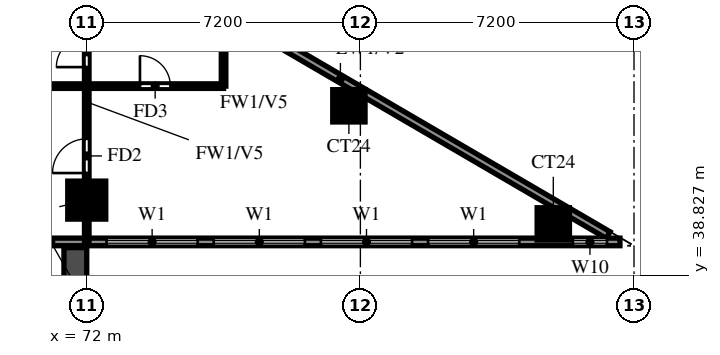
"""IFC4 building model, lengths in metres.
Left out: names, types, materials, properties, quantities, classifications, styles, units other than length and angle.
Written with IfcOpenShell. Run it as: python <this file> out.ifc"""

import sys

from ifc_helpers import new_model, si_unit, direction, frame, frame_2d, origin, origin_2d, place, context, subcontext, project, spatial, rectangle, extrude, source, transform, mapped, element, fill, save


model = new_model("IFC4")
c1 = context("Model", 3, precision=1e-05, world=origin(), true_north=direction((0.0, 1.0)))
c2 = subcontext(c1, "Body", "Model", "MODEL_VIEW")
j1 = project(units=[si_unit("LENGTHUNIT", "METRE"), si_unit("PLANEANGLEUNIT", "RADIAN")], contexts=[c1])
p1 = place(None, origin())
s1 = spatial("IfcSite", under=j1, at=p1, CompositionType="ELEMENT")
p2 = place(p1, origin())
s2 = spatial("IfcBuilding", under=s1, at=p2, CompositionType="ELEMENT")
p3 = place(p2, frame((0.0, 0.0, 167.5)))
s3 = spatial("IfcBuildingStorey", under=s2, at=p3, CompositionType="ELEMENT", Elevation=167.5)
m1 = source(origin(), c2, "Body", "SweptSolid", [
    extrude(rectangle(XDim=0.85, YDim=0.85, at=origin_2d()), origin(), (0.0, 0.0, 1.0), 3.2),
])
p4 = place(p3, frame((84.276, 40.174, 0.0), z_axis=(0.0, 0.0, 1.0), x_axis=(1.0, 0.0, 0.0)))
e1 = element("IfcColumn", 1, at=p4, inside=s3, PredefinedType="COLUMN", context=c2, shape_type="MappedRepresentation", body=[
    mapped(m1, transform((0.0, 0.0, 0.0))),
])
m2 = source(origin(), c2, "Body", "SweptSolid", [
    extrude(rectangle(XDim=1.0, YDim=1.0, at=origin_2d()), origin(), (0.0, 0.0, 1.0), 3.2),
])
p5 = place(p3, frame((72.0, 40.8, 0.0), z_axis=(0.0, 0.0, 1.0), x_axis=(1.0, 0.0, 0.0)))
e2 = element("IfcColumn", 2, at=p5, inside=s3, PredefinedType="COLUMN", context=c2, shape_type="MappedRepresentation", body=[
    mapped(m2, transform((0.0, 0.0, 0.0))),
])
p6 = place(p3, frame((78.898, 43.282, 0.0), z_axis=(0.0, 0.0, 1.0), x_axis=(1.0, 0.0, 0.0)))
e3 = element("IfcColumn", 3, at=p6, inside=s3, PredefinedType="COLUMN", context=c2, shape_type="MappedRepresentation", body=[
    mapped(m1, transform((0.0, 0.0, 0.0))),
])
p7 = place(p3, frame((85.719, 39.881, 0.0), z_axis=(0.0, 0.0, 1.0), x_axis=(-0.86377618652, 0.503875678716, 0.0)))
e4 = element("IfcWall", 4, at=p7, inside=s3, PredefinedType="SOLIDWALL", context=c2, shape_type="SweptSolid", body=[
    extrude(rectangle(XDim=16.311, YDim=0.2, at=frame_2d((8.156, 0.0))), origin(), (0.0, 0.0, 1.0), 3.2),
])
p8 = place(p7, frame((13.326, 0.0, 1.5)))
e5 = element("IfcOpeningElement", 5, at=p8, cuts=e4, PredefinedType="OPENING", context=c2, shape_type="SweptSolid", body=[
    extrude(rectangle(XDim=0.9, YDim=0.9, at=frame_2d((0.45, 0.45))), frame((0.0, 0.11, 0.0), z_axis=(0.0, -1.0, 0.0), x_axis=(1.0, 0.0, 0.0)), (0.0, 0.0, 1.0), 0.22),
])
p9 = place(p3, frame((58.8, 39.7, 0.0), z_axis=(0.0, 0.0, 1.0), x_axis=(1.0, 0.0, 0.0)))
e6 = element("IfcWall", 6, at=p9, inside=s3, PredefinedType="SOLIDWALL", context=c2, shape_type="SweptSolid", body=[
    extrude(rectangle(XDim=27.23, YDim=0.2, at=frame_2d((13.615, 0.0))), origin(), (0.0, 0.0, 1.0), 3.2),
])
p10 = place(p9, frame((7.5, 0.0, 0.0)))
e7 = element("IfcOpeningElement", 7, at=p10, cuts=e6, PredefinedType="OPENING", context=c2, shape_type="SweptSolid", body=[
    extrude(rectangle(XDim=1.8, YDim=2.4, at=frame_2d((0.9, 1.2))), frame((0.0, 0.11, 0.0), z_axis=(0.0, -1.0, 0.0), x_axis=(1.0, 0.0, 0.0)), (0.0, 0.0, 1.0), 0.22),
])
p11 = place(p9, frame((2.4, 0.0, 0.6)))
e8 = element("IfcOpeningElement", 8, at=p11, cuts=e6, PredefinedType="OPENING", context=c2, shape_type="SweptSolid", body=[
    extrude(rectangle(XDim=2.4, YDim=2.4, at=frame_2d((1.2, 1.2))), frame((0.0, 0.11, 0.0), z_axis=(0.0, -1.0, 0.0), x_axis=(1.0, 0.0, 0.0)), (0.0, 0.0, 1.0), 0.22),
])
p12 = place(p9, frame((13.72, 0.0, 0.6)))
e9 = element("IfcOpeningElement", 9, at=p12, cuts=e6, PredefinedType="OPENING", context=c2, shape_type="SweptSolid", body=[
    extrude(rectangle(XDim=2.4, YDim=2.4, at=frame_2d((1.2, 1.2))), frame((0.0, 0.11, 0.0), z_axis=(0.0, -1.0, 0.0), x_axis=(1.0, 0.0, 0.0)), (0.0, 0.0, 1.0), 0.22),
])
p13 = place(p9, frame((16.541, 0.0, 0.6)))
e10 = element("IfcOpeningElement", 10, at=p13, cuts=e6, PredefinedType="OPENING", context=c2, shape_type="SweptSolid", body=[
    extrude(rectangle(XDim=2.4, YDim=2.4, at=frame_2d((1.2, 1.2))), frame((0.0, 0.11, 0.0), z_axis=(0.0, -1.0, 0.0), x_axis=(1.0, 0.0, 0.0)), (0.0, 0.0, 1.0), 0.22),
])
p14 = place(p9, frame((19.361, 0.0, 0.6)))
e11 = element("IfcOpeningElement", 11, at=p14, cuts=e6, PredefinedType="OPENING", context=c2, shape_type="SweptSolid", body=[
    extrude(rectangle(XDim=2.4, YDim=2.4, at=frame_2d((1.2, 1.2))), frame((0.0, 0.11, 0.0), z_axis=(0.0, -1.0, 0.0), x_axis=(1.0, 0.0, 0.0)), (0.0, 0.0, 1.0), 0.22),
])
p15 = place(p9, frame((22.181, 0.0, 0.6)))
e12 = element("IfcOpeningElement", 12, at=p15, cuts=e6, PredefinedType="OPENING", context=c2, shape_type="SweptSolid", body=[
    extrude(rectangle(XDim=2.4, YDim=2.4, at=frame_2d((1.2, 1.2))), frame((0.0, 0.11, 0.0), z_axis=(0.0, -1.0, 0.0), x_axis=(1.0, 0.0, 0.0)), (0.0, 0.0, 1.0), 0.22),
])
p16 = place(p9, frame((25.99, 0.0, 0.6)))
e13 = element("IfcOpeningElement", 13, at=p16, cuts=e6, PredefinedType="OPENING", context=c2, shape_type="SweptSolid", body=[
    extrude(rectangle(XDim=0.9, YDim=2.4, at=frame_2d((0.45, 1.2))), frame((0.0, 0.11, 0.0), z_axis=(0.0, -1.0, 0.0), x_axis=(1.0, 0.0, 0.0)), (0.0, 0.0, 1.0), 0.22),
])
p17 = place(p3, frame((71.7, 39.55, 0.0), z_axis=(0.0, 0.0, 1.0), x_axis=(0.0, -1.0, 0.0)))
e14 = element("IfcWall", 14, at=p17, inside=s3, PredefinedType="SOLIDWALL", context=c2, shape_type="SweptSolid", body=[
    extrude(rectangle(XDim=2.65, YDim=0.6, at=frame_2d((1.325, 0.0))), origin(), (0.0, 0.0, 1.0), 2.85),
])
p18 = place(p3, frame((60.0, 43.8, 0.0), z_axis=(0.0, 0.0, 1.0), x_axis=(1.0, 0.0, 0.0)))
e15 = element("IfcWall", 15, at=p18, inside=s3, PredefinedType="PARTITIONING", context=c2, shape_type="SweptSolid", body=[
    extrude(rectangle(XDim=15.6, YDim=0.12, at=frame_2d((7.8, 0.0))), origin(), (0.0, 0.0, 1.0), 3.2),
])
p19 = place(p18, frame((9.75, 0.0, 0.0)))
e16 = element("IfcOpeningElement", 16, at=p19, cuts=e15, PredefinedType="OPENING", context=c2, shape_type="SweptSolid", body=[
    extrude(rectangle(XDim=0.9, YDim=2.1, at=frame_2d((0.45, 1.05))), frame((0.0, 0.07, 0.0), z_axis=(0.0, -1.0, 0.0), x_axis=(1.0, 0.0, 0.0)), (0.0, 0.0, 1.0), 0.14),
])
p20 = place(p18, frame((3.45, 0.0, 0.0)))
e17 = element("IfcOpeningElement", 17, at=p20, cuts=e15, PredefinedType="OPENING", context=c2, shape_type="SweptSolid", body=[
    extrude(rectangle(XDim=1.5, YDim=2.1, at=frame_2d((0.75, 1.05))), frame((0.0, 0.07, 0.0), z_axis=(0.0, -1.0, 0.0), x_axis=(1.0, 0.0, 0.0)), (0.0, 0.0, 1.0), 0.14),
])
p21 = place(p18, frame((13.4, 0.0, 0.0)))
e18 = element("IfcOpeningElement", 18, at=p21, cuts=e15, PredefinedType="OPENING", context=c2, shape_type="SweptSolid", body=[
    extrude(rectangle(XDim=0.8, YDim=2.1, at=frame_2d((0.4, 1.05))), frame((0.0, 0.07, 0.0), z_axis=(0.0, -1.0, 0.0), x_axis=(1.0, 0.0, 0.0)), (0.0, 0.0, 1.0), 0.14),
])
p22 = place(p3, frame((72.0, 39.725, 0.0), z_axis=(0.0, 0.0, 1.0), x_axis=(0.0, 1.0, 0.0)))
e19 = element("IfcWall", 19, at=p22, inside=s3, PredefinedType="PARTITIONING", context=c2, shape_type="SweptSolid", body=[
    extrude(rectangle(XDim=8.13, YDim=0.12, at=frame_2d((4.065, 0.0))), origin(), (0.0, 0.0, 1.0), 2.3),
])
p23 = place(p22, frame((1.788, 0.0, 0.0)))
e20 = element("IfcOpeningElement", 20, at=p23, cuts=e19, PredefinedType="OPENING", context=c2, shape_type="SweptSolid", body=[
    extrude(rectangle(XDim=0.9, YDim=2.1, at=frame_2d((0.45, 1.05))), frame((0.0, 0.07, 0.0), z_axis=(0.0, -1.0, 0.0), x_axis=(1.0, 0.0, 0.0)), (0.0, 0.0, 1.0), 0.14),
])
p24 = place(p22, frame((4.575, 0.0, 0.0)))
e21 = element("IfcOpeningElement", 21, at=p24, cuts=e19, PredefinedType="OPENING", context=c2, shape_type="SweptSolid", body=[
    extrude(rectangle(XDim=0.8, YDim=2.1, at=frame_2d((0.4, 1.05))), frame((0.0, 0.07, 0.0), z_axis=(0.0, -1.0, 0.0), x_axis=(1.0, 0.0, 0.0)), (0.0, 0.0, 1.0), 0.14),
])
p25 = place(p3, frame((75.6, 43.8, 0.0), z_axis=(0.0, 0.0, 1.0), x_axis=(0.0, 1.0, 0.0)))
e22 = element("IfcWall", 22, at=p25, inside=s3, PredefinedType="PARTITIONING", context=c2, shape_type="SweptSolid", body=[
    extrude(rectangle(XDim=1.868, YDim=0.12, at=frame_2d((0.934, 0.0))), origin(), (0.0, 0.0, 1.0), 2.3),
])
p26 = place(p12, origin())
e23 = element("IfcWindow", 23, at=p26, inside=s3, PartitioningType="DOUBLE_PANEL_VERTICAL", PredefinedType="WINDOW", context=c2, shape_type="SweptSolid", body=[
    extrude(rectangle(XDim=2.4, YDim=2.4, at=frame_2d((1.2, 1.2))), frame((0.0, 0.03, 0.0), z_axis=(0.0, -1.0, 0.0), x_axis=(1.0, 0.0, 0.0)), (0.0, 0.0, 1.0), 0.06),
])
fill(e9, e23)
p27 = place(p13, origin())
e24 = element("IfcWindow", 24, at=p27, inside=s3, PartitioningType="DOUBLE_PANEL_VERTICAL", PredefinedType="WINDOW", context=c2, shape_type="SweptSolid", body=[
    extrude(rectangle(XDim=2.4, YDim=2.4, at=frame_2d((1.2, 1.2))), frame((0.0, 0.03, 0.0), z_axis=(0.0, -1.0, 0.0), x_axis=(1.0, 0.0, 0.0)), (0.0, 0.0, 1.0), 0.06),
])
fill(e10, e24)
p28 = place(p14, origin())
e25 = element("IfcWindow", 25, at=p28, inside=s3, PartitioningType="DOUBLE_PANEL_VERTICAL", PredefinedType="WINDOW", context=c2, shape_type="SweptSolid", body=[
    extrude(rectangle(XDim=2.4, YDim=2.4, at=frame_2d((1.2, 1.2))), frame((0.0, 0.03, 0.0), z_axis=(0.0, -1.0, 0.0), x_axis=(1.0, 0.0, 0.0)), (0.0, 0.0, 1.0), 0.06),
])
fill(e11, e25)
p29 = place(p15, origin())
e26 = element("IfcWindow", 26, at=p29, inside=s3, PartitioningType="DOUBLE_PANEL_VERTICAL", PredefinedType="WINDOW", context=c2, shape_type="SweptSolid", body=[
    extrude(rectangle(XDim=2.4, YDim=2.4, at=frame_2d((1.2, 1.2))), frame((0.0, 0.03, 0.0), z_axis=(0.0, -1.0, 0.0), x_axis=(1.0, 0.0, 0.0)), (0.0, 0.0, 1.0), 0.06),
])
fill(e12, e26)
p30 = place(p16, origin())
e27 = element("IfcWindow", 27, at=p30, inside=s3, PartitioningType="SINGLE_PANEL", PredefinedType="WINDOW", context=c2, shape_type="SweptSolid", body=[
    extrude(rectangle(XDim=0.9, YDim=2.4, at=frame_2d((0.45, 1.2))), frame((0.0, 0.03, 0.0), z_axis=(0.0, -1.0, 0.0), x_axis=(1.0, 0.0, 0.0)), (0.0, 0.0, 1.0), 0.06),
])
fill(e13, e27)
p31 = place(p23, origin())
e28 = element("IfcDoor", 28, at=p31, inside=s3, OperationType="SINGLE_SWING_RIGHT", PredefinedType="DOOR", context=c2, shape_type="SweptSolid", body=[
    extrude(rectangle(XDim=0.9, YDim=2.1, at=frame_2d((0.45, 1.05))), frame((0.0, 0.025, 0.0), z_axis=(0.0, -1.0, 0.0), x_axis=(1.0, 0.0, 0.0)), (0.0, 0.0, 1.0), 0.05),
])
fill(e20, e28)
p32 = place(p24, origin())
e29 = element("IfcDoor", 29, at=p32, inside=s3, OperationType="SINGLE_SWING_RIGHT", PredefinedType="DOOR", context=c2, shape_type="SweptSolid", body=[
    extrude(rectangle(XDim=0.8, YDim=2.1, at=frame_2d((0.4, 1.05))), frame((0.0, 0.025, 0.0), z_axis=(0.0, -1.0, 0.0), x_axis=(1.0, 0.0, 0.0)), (0.0, 0.0, 1.0), 0.05),
])
fill(e21, e29)
p33 = place(p21, origin())
e30 = element("IfcDoor", 30, at=p33, inside=s3, OperationType="SINGLE_SWING_LEFT", PredefinedType="DOOR", context=c2, shape_type="SweptSolid", body=[
    extrude(rectangle(XDim=0.8, YDim=2.1, at=frame_2d((0.4, 1.05))), frame((0.0, 0.025, 0.0), z_axis=(0.0, -1.0, 0.0), x_axis=(1.0, 0.0, 0.0)), (0.0, 0.0, 1.0), 0.05),
])
fill(e18, e30)
save(model, sys.argv[1])
